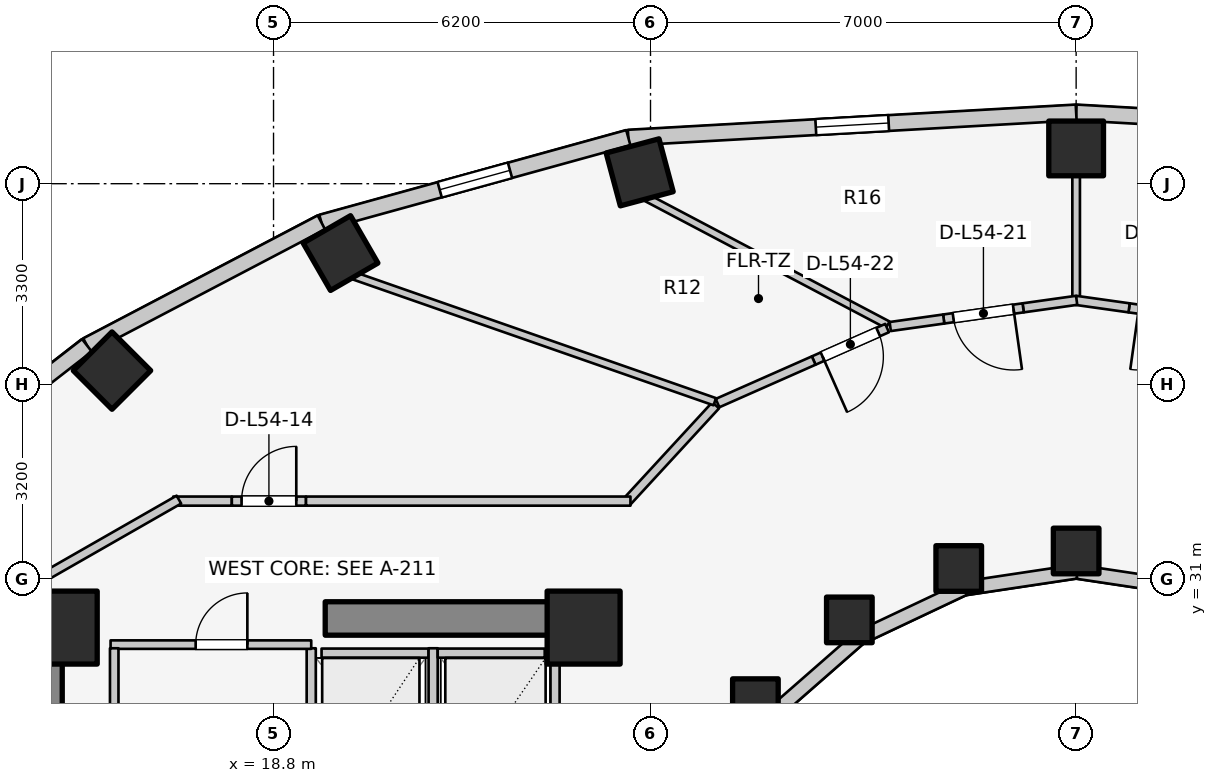
"""IFC4 building model, lengths in metres.
Left out: names, types, materials, properties, quantities, classifications, styles, units other than length and angle.
Written with IfcOpenShell. Run it as: python <this file> out.ifc"""

import sys

from ifc_helpers import new_model, si_unit, direction, frame, frame_2d, origin, origin_2d, place, context, subcontext, project, spatial, rectangle, extrude, element, fill, save


model = new_model("IFC4")
c1 = context("Model", 3, precision=1e-05, world=origin(), true_north=direction((0.0, 1.0)))
c2 = subcontext(c1, "Body", "Model", "MODEL_VIEW")
j1 = project(units=[si_unit("LENGTHUNIT", "METRE"), si_unit("PLANEANGLEUNIT", "RADIAN")], contexts=[c1])
p1 = place(None, origin())
s1 = spatial("IfcSite", under=j1, at=p1, CompositionType="ELEMENT")
p2 = place(p1, origin())
s2 = spatial("IfcBuilding", under=s1, at=p2, CompositionType="ELEMENT")
p3 = place(p2, frame((0.0, 0.0, 177.7)))
s3 = spatial("IfcBuildingStorey", under=s2, at=p3, CompositionType="ELEMENT", Elevation=177.7)
p4 = place(p3, frame((15.05, 17.05, 0.0), z_axis=(0.0, 0.0, 1.0), x_axis=(0.0, 1.0, 0.0)))
e1 = element("IfcWall", 1, at=p4, inside=s3, PredefinedType="SHEAR", context=c2, shape_type="SweptSolid", body=[
    extrude(rectangle(XDim=12.8, YDim=0.55, at=frame_2d((6.4, 0.0))), origin(), (0.0, 0.0, 1.0), 3.1),
])
p5 = place(p3, frame((19.65, 30.35, 0.0), z_axis=(0.0, 0.0, 1.0), x_axis=(1.0, 0.0, 0.0)))
e2 = element("IfcWall", 2, at=p5, inside=s3, PredefinedType="SHEAR", context=c2, shape_type="SweptSolid", body=[
    extrude(rectangle(XDim=4.5, YDim=0.55, at=frame_2d((2.25, 0.0))), origin(), (0.0, 0.0, 1.0), 3.1),
])
for number, where, z_axis, x_axis in (
    (3, (23.9, 30.2, 0.0), (0.0, 0.0, 1.0), (1.0, 0.0, 0.0)),
    (4, (15.3, 30.2, 0.0), (0.0, 0.0, 1.0), (1.0, 0.0, 0.0)),
):
    element("IfcColumn", number, at=place(p3, frame(where, z_axis=z_axis, x_axis=x_axis)), inside=s3, PredefinedType="COLUMN", context=c2, shape_type="SweptSolid", body=[
        extrude(rectangle(XDim=1.2, YDim=1.2, at=origin_2d()), origin(), (0.0, 0.0, 1.0), 3.1),
    ])
p6 = place(p3, frame((32.0, 31.46, 0.0), z_axis=(0.0, 0.0, 1.0), x_axis=(1.0, 0.0, 0.0)))
e5 = element("IfcColumn", 5, at=p6, inside=s3, PredefinedType="COLUMN", context=c2, shape_type="SweptSolid", body=[
    extrude(rectangle(XDim=0.75, YDim=0.75, at=origin_2d()), origin(), (0.0, 0.0, 1.0), 3.1),
])
p7 = place(p3, frame((32.0, 38.08, 0.0), z_axis=(0.0, 0.0, 1.0), x_axis=(0.0, 1.0, 0.0)))
e6 = element("IfcColumn", 6, at=p7, inside=s3, PredefinedType="COLUMN", context=c2, shape_type="SweptSolid", body=[
    extrude(rectangle(XDim=0.9, YDim=0.9, at=origin_2d()), origin(), (0.0, 0.0, 1.0), 3.1),
])
p8 = place(p3, frame((30.069, 31.172, 0.0), z_axis=(0.0, 0.0, 1.0), x_axis=(1.0, 0.0, 0.0)))
e7 = element("IfcColumn", 7, at=p8, inside=s3, PredefinedType="COLUMN", context=c2, shape_type="SweptSolid", body=[
    extrude(rectangle(XDim=0.75, YDim=0.75, at=origin_2d()), origin(), (0.0, 0.0, 1.0), 3.1),
])
p9 = place(p3, frame((24.822, 37.687, 0.0), z_axis=(0.0, 0.0, 1.0), x_axis=(-0.258819045103, 0.965925826289, 0.0)))
e8 = element("IfcColumn", 8, at=p9, inside=s3, PredefinedType="COLUMN", context=c2, shape_type="SweptSolid", body=[
    extrude(rectangle(XDim=0.9, YDim=0.9, at=origin_2d()), origin(), (0.0, 0.0, 1.0), 3.1),
])
p10 = place(p3, frame((28.27, 30.327, 0.0), z_axis=(0.0, 0.0, 1.0), x_axis=(1.0, 0.0, 0.0)))
e9 = element("IfcColumn", 9, at=p10, inside=s3, PredefinedType="COLUMN", context=c2, shape_type="SweptSolid", body=[
    extrude(rectangle(XDim=0.75, YDim=0.75, at=origin_2d()), origin(), (0.0, 0.0, 1.0), 3.1),
])
p11 = place(p3, frame((19.902, 36.359, 0.0), z_axis=(0.0, 0.0, 1.0), x_axis=(-0.5, 0.866025403784, 0.0)))
e10 = element("IfcColumn", 10, at=p11, inside=s3, PredefinedType="COLUMN", context=c2, shape_type="SweptSolid", body=[
    extrude(rectangle(XDim=0.9, YDim=0.9, at=origin_2d()), origin(), (0.0, 0.0, 1.0), 3.1),
])
p12 = place(p3, frame((26.725, 28.982, 0.0), z_axis=(0.0, 0.0, 1.0), x_axis=(1.0, 0.0, 0.0)))
e11 = element("IfcColumn", 11, at=p12, inside=s3, PredefinedType="COLUMN", context=c2, shape_type="SweptSolid", body=[
    extrude(rectangle(XDim=0.75, YDim=0.75, at=origin_2d()), origin(), (0.0, 0.0, 1.0), 3.1),
])
p13 = place(p3, frame((16.143, 34.427, 0.0), z_axis=(0.0, 0.0, 1.0), x_axis=(-0.707106781187, 0.707106781187, 0.0)))
e12 = element("IfcColumn", 12, at=p13, inside=s3, PredefinedType="COLUMN", context=c2, shape_type="SweptSolid", body=[
    extrude(rectangle(XDim=0.9, YDim=0.9, at=origin_2d()), origin(), (0.0, 0.0, 1.0), 3.1),
])
for number, where, z_axis, x_axis in (
    (13, (33.843, 30.843, 0.0), (0.0, 0.0, 1.0), (-0.989, 0.149, 0.0)),
    (14, (32.0, 31.12, 0.0), (0.0, 0.0, 1.0), (-0.989, -0.149, 0.0)),
):
    element("IfcWall", number, at=place(p3, frame(where, z_axis=z_axis, x_axis=x_axis)), inside=s3, PredefinedType="STANDARD", context=c2, shape_type="SweptSolid", body=[
        extrude(rectangle(XDim=1.864, YDim=0.23, at=frame_2d((0.932, 0.0))), origin(), (0.0, 0.0, 1.0), 1.22),
    ])
p14 = place(p3, frame((30.157, 30.843, 0.0), z_axis=(0.0, 0.0, 1.0), x_axis=(-0.904179699603, -0.427152280606, 0.0)))
e15 = element("IfcWall", 15, at=p14, inside=s3, PredefinedType="STANDARD", context=c2, shape_type="SweptSolid", body=[
    extrude(rectangle(XDim=1.899, YDim=0.23, at=frame_2d((0.95, 0.0))), origin(), (0.0, 0.0, 1.0), 1.22),
])
p15 = place(p3, frame((28.44, 30.032, 0.0), z_axis=(0.0, 0.0, 1.0), x_axis=(-0.752576694707, -0.658504607869, 0.0)))
e16 = element("IfcWall", 16, at=p15, inside=s3, PredefinedType="STANDARD", context=c2, shape_type="SweptSolid", body=[
    extrude(rectangle(XDim=1.959, YDim=0.23, at=frame_2d((0.98, 0.0))), origin(), (0.0, 0.0, 1.0), 1.22),
])
p16 = place(p3, frame((39.365, 38.257, 0.0), z_axis=(0.0, 0.0, 1.0), x_axis=(-0.998417906562, 0.056228852534, 0.0)))
e17 = element("IfcWall", 17, at=p16, inside=s3, PredefinedType="STANDARD", context=c2, shape_type="SweptSolid", body=[
    extrude(rectangle(XDim=7.377, YDim=0.26, at=frame_2d((3.688, 0.0))), origin(), (0.0, 0.0, 1.0), 1.22),
])
p17 = place(p16, frame((3.088, 0.0, 0.15)))
e18 = element("IfcOpeningElement", 18, at=p17, cuts=e17, PredefinedType="OPENING", context=c2, shape_type="SweptSolid", body=[
    extrude(rectangle(XDim=1.2, YDim=0.9, at=frame_2d((0.6, 0.45))), frame((0.0, 0.14, 0.0), z_axis=(0.0, -1.0, 0.0), x_axis=(1.0, 0.0, 0.0)), (0.0, 0.0, 1.0), 0.28),
])
p18 = place(p3, frame((32.0, 38.671, 0.0), z_axis=(0.0, 0.0, 1.0), x_axis=(-0.998417906562, -0.056228852534, 0.0)))
e19 = element("IfcWall", 19, at=p18, inside=s3, PredefinedType="STANDARD", context=c2, shape_type="SweptSolid", body=[
    extrude(rectangle(XDim=7.377, YDim=0.26, at=frame_2d((3.688, 0.0))), origin(), (0.0, 0.0, 1.0), 1.22),
])
p19 = place(p18, frame((3.088, 0.0, 0.15)))
e20 = element("IfcOpeningElement", 20, at=p19, cuts=e19, PredefinedType="OPENING", context=c2, shape_type="SweptSolid", body=[
    extrude(rectangle(XDim=1.2, YDim=0.9, at=frame_2d((0.6, 0.45))), frame((0.0, 0.14, 0.0), z_axis=(0.0, -1.0, 0.0), x_axis=(1.0, 0.0, 0.0)), (0.0, 0.0, 1.0), 0.28),
])
p20 = place(p3, frame((24.635, 38.257, 0.0), z_axis=(0.0, 0.0, 1.0), x_axis=(-0.963953455704, -0.26607092144, 0.0)))
e21 = element("IfcWall", 21, at=p20, inside=s3, PredefinedType="STANDARD", context=c2, shape_type="SweptSolid", body=[
    extrude(rectangle(XDim=5.237, YDim=0.26, at=frame_2d((2.618, 0.0))), origin(), (0.0, 0.0, 1.0), 1.22),
])
p21 = place(p20, frame((2.018, 0.0, 0.15)))
e22 = element("IfcOpeningElement", 22, at=p21, cuts=e21, PredefinedType="OPENING", context=c2, shape_type="SweptSolid", body=[
    extrude(rectangle(XDim=1.2, YDim=0.9, at=frame_2d((0.6, 0.45))), frame((0.0, 0.14, 0.0), z_axis=(0.0, -1.0, 0.0), x_axis=(1.0, 0.0, 0.0)), (0.0, 0.0, 1.0), 0.28),
])
p22 = place(p3, frame((19.587, 36.863, 0.0), z_axis=(0.0, 0.0, 1.0), x_axis=(-0.885660265226, -0.464333818065, 0.0)))
e23 = element("IfcWall", 23, at=p22, inside=s3, PredefinedType="STANDARD", context=c2, shape_type="SweptSolid", body=[
    extrude(rectangle(XDim=4.354, YDim=0.26, at=frame_2d((2.177, 0.0))), origin(), (0.0, 0.0, 1.0), 1.22),
])
p23 = place(p3, frame((15.731, 34.842, 0.0), z_axis=(0.0, 0.0, 1.0), x_axis=(-0.790185650662, -0.612867552973, 0.0)))
e24 = element("IfcWall", 24, at=p23, inside=s3, PredefinedType="STANDARD", context=c2, shape_type="SweptSolid", body=[
    extrude(rectangle(XDim=4.239, YDim=0.26, at=frame_2d((2.12, 0.0))), origin(), (0.0, 0.0, 1.0), 1.22),
])
p24 = place(p23, frame((1.52, 0.0, 0.15)))
e25 = element("IfcOpeningElement", 25, at=p24, cuts=e24, PredefinedType="OPENING", context=c2, shape_type="SweptSolid", body=[
    extrude(rectangle(XDim=1.2, YDim=0.9, at=frame_2d((0.6, 0.45))), frame((0.0, 0.14, 0.0), z_axis=(0.0, -1.0, 0.0), x_axis=(1.0, 0.0, 0.0)), (0.0, 0.0, 1.0), 0.28),
])
p25 = place(p3, frame((19.59, 29.78, 0.0), z_axis=(0.0, 0.0, 1.0), x_axis=(1.0, 0.0, 0.0)))
e26 = element("IfcWall", 26, at=p25, inside=s3, PredefinedType="SOLIDWALL", context=c2, shape_type="SweptSolid", body=[
    extrude(rectangle(XDim=1.76, YDim=0.15, at=frame_2d((0.88, 0.0))), origin(), (0.0, 0.0, 1.0), 2.575),
])
for number, where, z_axis, x_axis in (
    (27, (19.42, 27.14, 0.0), (0.0, 0.0, 1.0), (0.0, 1.0, 0.0)),
    (28, (21.425, 27.14, 0.0), (0.0, 0.0, 1.0), (0.0, 1.0, 0.0)),
):
    element("IfcWall", number, at=place(p3, frame(where, z_axis=z_axis, x_axis=x_axis)), inside=s3, PredefinedType="SOLIDWALL", context=c2, shape_type="SweptSolid", body=[
        extrude(rectangle(XDim=2.72, YDim=0.15, at=frame_2d((1.36, 0.0))), origin(), (0.0, 0.0, 1.0), 2.575),
    ])
p26 = place(p3, frame((21.5, 29.78, 0.0), z_axis=(0.0, 0.0, 1.0), x_axis=(1.0, 0.0, 0.0)))
e29 = element("IfcWall", 29, at=p26, inside=s3, PredefinedType="SOLIDWALL", context=c2, shape_type="SweptSolid", body=[
    extrude(rectangle(XDim=1.76, YDim=0.15, at=frame_2d((0.88, 0.0))), origin(), (0.0, 0.0, 1.0), 2.575),
])
p27 = place(p3, frame((23.43, 27.14, 0.0), z_axis=(0.0, 0.0, 1.0), x_axis=(0.0, 1.0, 0.0)))
e30 = element("IfcWall", 30, at=p27, inside=s3, PredefinedType="SOLIDWALL", context=c2, shape_type="SweptSolid", body=[
    extrude(rectangle(XDim=2.72, YDim=0.15, at=frame_2d((1.36, 0.0))), origin(), (0.0, 0.0, 1.0), 2.575),
])
p28 = place(p3, frame((16.12, 29.92, 0.0), z_axis=(0.0, 0.0, 1.0), x_axis=(1.0, 0.0, 0.0)))
e31 = element("IfcWall", 31, at=p28, inside=s3, PredefinedType="PLUMBINGWALL", context=c2, shape_type="SweptSolid", body=[
    extrude(rectangle(XDim=3.3, YDim=0.14, at=frame_2d((1.65, 0.0))), origin(), (0.0, 0.0, 1.0), 2.575),
])
p29 = place(p28, frame((1.399, 0.0, 0.0)))
e32 = element("IfcOpeningElement", 32, at=p29, cuts=e31, PredefinedType="OPENING", context=c2, shape_type="SweptSolid", body=[
    extrude(rectangle(XDim=0.85, YDim=2.05, at=frame_2d((0.425, 1.025))), frame((0.0, 0.08, 0.0), z_axis=(0.0, -1.0, 0.0), x_axis=(1.0, 0.0, 0.0)), (0.0, 0.0, 1.0), 0.16),
])
p30 = place(p3, frame((16.18, 25.98, 0.0), z_axis=(0.0, 0.0, 1.0), x_axis=(0.0, 1.0, 0.0)))
e33 = element("IfcWall", 33, at=p30, inside=s3, PredefinedType="PLUMBINGWALL", context=c2, shape_type="SweptSolid", body=[
    extrude(rectangle(XDim=3.88, YDim=0.14, at=frame_2d((1.94, 0.0))), origin(), (0.0, 0.0, 1.0), 2.575),
])
p31 = place(p3, frame((26.072, 33.856, 0.0), z_axis=(0.0, 0.0, 1.0), x_axis=(-0.677579737957, -0.735449317567, 0.0)))
e34 = element("IfcWall", 34, at=p31, inside=s3, PredefinedType="PARTITIONING", context=c2, shape_type="SweptSolid", body=[
    extrude(rectangle(XDim=2.173, YDim=0.15, at=frame_2d((1.086, 0.0))), origin(), (0.0, 0.0, 1.0), 1.22),
])
p32 = place(p3, frame((17.15, 32.28, 0.0), z_axis=(0.0, 0.0, 1.0), x_axis=(1.0, 0.0, 0.0)))
e35 = element("IfcWall", 35, at=p32, inside=s3, PredefinedType="PARTITIONING", context=c2, shape_type="SweptSolid", body=[
    extrude(rectangle(XDim=0.964, YDim=0.15, at=frame_2d((0.482, 0.0))), origin(), (0.0, 0.0, 1.0), 2.575),
])
p33 = place(p3, frame((18.114, 32.28, 0.0), z_axis=(0.0, 0.0, 1.0), x_axis=(1.0, 0.0, 0.0)))
e36 = element("IfcWall", 36, at=p33, inside=s3, PredefinedType="PARTITIONING", context=c2, shape_type="SweptSolid", body=[
    extrude(rectangle(XDim=1.22, YDim=0.15, at=frame_2d((0.61, 0.0))), origin(), (0.0, 0.0, 1.0), 2.16),
])
p34 = place(p33, frame((0.16, 0.0, 0.0)))
e37 = element("IfcOpeningElement", 37, at=p34, cuts=e36, PredefinedType="OPENING", context=c2, shape_type="SweptSolid", body=[
    extrude(rectangle(XDim=0.9, YDim=2.1, at=frame_2d((0.45, 1.05))), frame((0.0, 0.085, 0.0), z_axis=(0.0, -1.0, 0.0), x_axis=(1.0, 0.0, 0.0)), (0.0, 0.0, 1.0), 0.17),
])
p35 = place(p3, frame((19.334, 32.28, 0.0), z_axis=(0.0, 0.0, 1.0), x_axis=(1.0, 0.0, 0.0)))
e38 = element("IfcWall", 38, at=p35, inside=s3, PredefinedType="PARTITIONING", context=c2, shape_type="SweptSolid", body=[
    extrude(rectangle(XDim=5.336, YDim=0.15, at=frame_2d((2.668, 0.0))), origin(), (0.0, 0.0, 1.0), 1.22),
])
p36 = place(p3, frame((17.243, 32.305, 0.0), z_axis=(0.0, 0.0, 1.0), x_axis=(-0.867991349648, -0.496579315857, 0.0)))
e39 = element("IfcWall", 39, at=p36, inside=s3, PredefinedType="PARTITIONING", context=c2, shape_type="SweptSolid", body=[
    extrude(rectangle(XDim=2.567, YDim=0.15, at=frame_2d((1.283, 0.0))), origin(), (0.0, 0.0, 1.0), 1.22),
])
p37 = place(p3, frame((32.0, 35.637, 0.0), z_axis=(0.0, 0.0, 1.0), x_axis=(0.0, 1.0, 0.0)))
e40 = element("IfcWall", 40, at=p37, inside=s3, PredefinedType="PARTITIONING", context=c2, shape_type="SweptSolid", body=[
    extrude(rectangle(XDim=2.013, YDim=0.125, at=frame_2d((1.006, 0.0))), origin(), (0.0, 0.0, 1.0), 1.22),
])
p38 = place(p3, frame((28.902, 35.179, 0.0), z_axis=(0.0, 0.0, 1.0), x_axis=(-0.884576855896, 0.466394453241, 0.0)))
e41 = element("IfcWall", 41, at=p38, inside=s3, PredefinedType="PARTITIONING", context=c2, shape_type="SweptSolid", body=[
    extrude(rectangle(XDim=4.487, YDim=0.125, at=frame_2d((2.243, 0.0))), origin(), (0.0, 0.0, 1.0), 1.22),
])
p39 = place(p3, frame((26.057, 33.914, 0.0), z_axis=(0.0, 0.0, 1.0), x_axis=(-0.944182779284, 0.329422038278, 0.0)))
e42 = element("IfcWall", 42, at=p39, inside=s3, PredefinedType="PARTITIONING", context=c2, shape_type="SweptSolid", body=[
    extrude(rectangle(XDim=6.291, YDim=0.125, at=frame_2d((3.146, 0.0))), origin(), (0.0, 0.0, 1.0), 1.22),
])
p40 = place(p3, frame((34.178, 35.275, 0.0), z_axis=(0.0, 0.0, 1.0), x_axis=(-0.990250599082, 0.139297347489, 0.0)))
e43 = element("IfcWall", 43, at=p40, inside=s3, PredefinedType="PARTITIONING", context=c2, shape_type="SweptSolid", body=[
    extrude(rectangle(XDim=1.32, YDim=0.15, at=frame_2d((0.66, 0.0))), origin(), (0.0, 0.0, 1.0), 2.575),
])
p41 = place(p40, frame((0.16, 0.0, 0.0)))
e44 = element("IfcOpeningElement", 44, at=p41, cuts=e43, PredefinedType="OPENING", context=c2, shape_type="SweptSolid", body=[
    extrude(rectangle(XDim=1.0, YDim=2.1, at=frame_2d((0.5, 1.05))), frame((0.0, 0.085, 0.0), z_axis=(0.0, -1.0, 0.0), x_axis=(1.0, 0.0, 0.0)), (0.0, 0.0, 1.0), 0.17),
])
for number, where, z_axis, x_axis in (
    (45, (32.871, 35.458, 0.0), (0.0, 0.0, 1.0), (-0.99, 0.139, 0.0)),
    (46, (32.008, 35.582, 0.0), (0.0, 0.0, 1.0), (-0.99, -0.139, 0.0)),
):
    element("IfcWall", number, at=place(p3, frame(where, z_axis=z_axis, x_axis=x_axis)), inside=s3, PredefinedType="PARTITIONING", context=c2, shape_type="SweptSolid", body=[
        extrude(rectangle(XDim=0.888, YDim=0.15, at=frame_2d((0.444, 0.0))), origin(), (0.0, 0.0, 1.0), 1.22),
    ])
p42 = place(p3, frame((31.129, 35.458, 0.0), z_axis=(0.0, 0.0, 1.0), x_axis=(-0.990254187593, -0.139271834751, 0.0)))
e47 = element("IfcWall", 47, at=p42, inside=s3, PredefinedType="PARTITIONING", context=c2, shape_type="SweptSolid", body=[
    extrude(rectangle(XDim=1.32, YDim=0.15, at=frame_2d((0.66, 0.0))), origin(), (0.0, 0.0, 1.0), 2.575),
])
p43 = place(p42, frame((0.16, 0.0, 0.0)))
e48 = element("IfcOpeningElement", 48, at=p43, cuts=e47, PredefinedType="OPENING", context=c2, shape_type="SweptSolid", body=[
    extrude(rectangle(XDim=1.0, YDim=2.1, at=frame_2d((0.5, 1.05))), frame((0.0, 0.085, 0.0), z_axis=(0.0, -1.0, 0.0), x_axis=(1.0, 0.0, 0.0)), (0.0, 0.0, 1.0), 0.17),
])
p44 = place(p3, frame((29.822, 35.275, 0.0), z_axis=(0.0, 0.0, 1.0), x_axis=(-0.990233457483, -0.139419151054, 0.0)))
e49 = element("IfcWall", 49, at=p44, inside=s3, PredefinedType="PARTITIONING", context=c2, shape_type="SweptSolid", body=[
    extrude(rectangle(XDim=0.888, YDim=0.15, at=frame_2d((0.444, 0.0))), origin(), (0.0, 0.0, 1.0), 2.575),
])
p45 = place(p3, frame((28.891, 35.125, 0.0), z_axis=(0.0, 0.0, 1.0), x_axis=(-0.914519545761, -0.404541716541, 0.0)))
e50 = element("IfcWall", 50, at=p45, inside=s3, PredefinedType="PARTITIONING", context=c2, shape_type="SweptSolid", body=[
    extrude(rectangle(XDim=1.32, YDim=0.15, at=frame_2d((0.66, 0.0))), origin(), (0.0, 0.0, 1.0), 2.16),
])
p46 = place(p45, frame((0.16, 0.0, 0.0)))
e51 = element("IfcOpeningElement", 51, at=p46, cuts=e50, PredefinedType="OPENING", context=c2, shape_type="SweptSolid", body=[
    extrude(rectangle(XDim=1.0, YDim=2.1, at=frame_2d((0.5, 1.05))), frame((0.0, 0.085, 0.0), z_axis=(0.0, -1.0, 0.0), x_axis=(1.0, 0.0, 0.0)), (0.0, 0.0, 1.0), 0.17),
])
p47 = place(p3, frame((27.684, 34.592, 0.0), z_axis=(0.0, 0.0, 1.0), x_axis=(-0.914520274566, -0.404540068978, 0.0)))
e52 = element("IfcWall", 52, at=p47, inside=s3, PredefinedType="PARTITIONING", context=c2, shape_type="SweptSolid", body=[
    extrude(rectangle(XDim=1.73, YDim=0.15, at=frame_2d((0.865, 0.0))), origin(), (0.0, 0.0, 1.0), 1.22),
])
p48 = place(p19, origin())
e53 = element("IfcWindow", 53, at=p48, inside=s3, PartitioningType="SINGLE_PANEL", PredefinedType="WINDOW", context=c2, shape_type="SweptSolid", body=[
    extrude(rectangle(XDim=1.2, YDim=0.9, at=frame_2d((0.6, 0.45))), frame((0.0, 0.03, 0.0), z_axis=(0.0, -1.0, 0.0), x_axis=(1.0, 0.0, 0.0)), (0.0, 0.0, 1.0), 0.06),
])
fill(e20, e53)
p49 = place(p21, origin())
e54 = element("IfcWindow", 54, at=p49, inside=s3, PartitioningType="SINGLE_PANEL", PredefinedType="WINDOW", context=c2, shape_type="SweptSolid", body=[
    extrude(rectangle(XDim=1.2, YDim=0.9, at=frame_2d((0.6, 0.45))), frame((0.0, 0.03, 0.0), z_axis=(0.0, -1.0, 0.0), x_axis=(1.0, 0.0, 0.0)), (0.0, 0.0, 1.0), 0.06),
])
fill(e22, e54)
p50 = place(p29, origin())
e55 = element("IfcDoor", 55, at=p50, inside=s3, OperationType="SINGLE_SWING_RIGHT", PredefinedType="DOOR", context=c2, shape_type="SweptSolid", body=[
    extrude(rectangle(XDim=0.85, YDim=2.05, at=frame_2d((0.425, 1.025))), frame((0.0, 0.025, 0.0), z_axis=(0.0, -1.0, 0.0), x_axis=(1.0, 0.0, 0.0)), (0.0, 0.0, 1.0), 0.05),
])
fill(e32, e55)
p51 = place(p34, origin())
e56 = element("IfcDoor", 56, at=p51, inside=s3, OperationType="SINGLE_SWING_RIGHT", PredefinedType="DOOR", context=c2, shape_type="SweptSolid", body=[
    extrude(rectangle(XDim=0.9, YDim=2.1, at=frame_2d((0.45, 1.05))), frame((0.0, 0.025, 0.0), z_axis=(0.0, -1.0, 0.0), x_axis=(1.0, 0.0, 0.0)), (0.0, 0.0, 1.0), 0.05),
])
fill(e37, e56)
p52 = place(p43, origin())
e57 = element("IfcDoor", 57, at=p52, inside=s3, OperationType="SINGLE_SWING_LEFT", PredefinedType="DOOR", context=c2, shape_type="SweptSolid", body=[
    extrude(rectangle(XDim=1.0, YDim=2.1, at=frame_2d((0.5, 1.05))), frame((0.0, 0.025, 0.0), z_axis=(0.0, -1.0, 0.0), x_axis=(1.0, 0.0, 0.0)), (0.0, 0.0, 1.0), 0.05),
])
fill(e48, e57)
p53 = place(p46, origin())
e58 = element("IfcDoor", 58, at=p53, inside=s3, OperationType="SINGLE_SWING_RIGHT", PredefinedType="DOOR", context=c2, shape_type="SweptSolid", body=[
    extrude(rectangle(XDim=1.0, YDim=2.1, at=frame_2d((0.5, 1.05))), frame((0.0, 0.025, 0.0), z_axis=(0.0, -1.0, 0.0), x_axis=(1.0, 0.0, 0.0)), (0.0, 0.0, 1.0), 0.05),
])
fill(e51, e58)
save(model, sys.argv[1])
